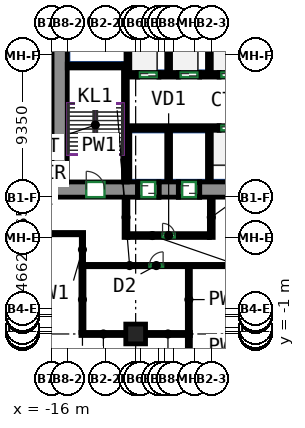
"""IFC4 building model, lengths in metres.
Left out: names, types, materials, properties, quantities, classifications, styles, units other than length and angle.
Written with IfcOpenShell. Run it as: python <this file> out.ifc"""

import sys

from ifc_helpers import new_model, si_unit, direction, frame, frame_2d, origin, origin_2d, place, context, subcontext, project, spatial, rectangle, extrude, source, transform, mapped, element, fill, save


model = new_model("IFC4")
c1 = context("Model", 3, precision=1e-05, world=origin(), true_north=direction((0.0, 1.0)))
c2 = subcontext(c1, "Body", "Model", "MODEL_VIEW")
j1 = project(units=[si_unit("LENGTHUNIT", "METRE"), si_unit("PLANEANGLEUNIT", "RADIAN")], contexts=[c1])
p1 = place(None, origin())
s1 = spatial("IfcSite", under=j1, at=p1, CompositionType="ELEMENT")
p2 = place(p1, origin())
s2 = spatial("IfcBuilding", under=s1, at=p2, CompositionType="ELEMENT")
p3 = place(p2, origin())
s3 = spatial("IfcBuildingStorey", under=s2, at=p3, CompositionType="ELEMENT", Elevation=0.0)
m1 = source(origin(), c2, "Body", "SweptSolid", [
    extrude(rectangle(XDim=1.3, YDim=1.3, at=origin_2d()), origin(), (0.0, 0.0, 1.0), 8.6),
])
p4 = place(p3, frame((-10.5, -1.0, 0.0), z_axis=(0.0, 0.0, 1.0), x_axis=(1.0, 0.0, 0.0)))
e1 = element("IfcColumn", 1, at=p4, inside=s3, PredefinedType="COLUMN", context=c2, shape_type="MappedRepresentation", body=[
    mapped(m1, transform((0.0, 0.0, 0.0))),
])
m2 = source(origin(), c2, "Body", "SweptSolid", [
    extrude(rectangle(XDim=5.63, YDim=1.0, at=frame_2d((2.815, 0.0))), origin(), (0.0, 0.0, 1.0), 8.6),
])
p5 = place(p3, frame((-16.0, 8.5, 0.0), z_axis=(0.0, 0.0, 1.0), x_axis=(1.0, 0.0, 0.0)))
e2 = element("IfcWall", 2, at=p5, inside=s3, PredefinedType="SHEAR", context=c2, shape_type="MappedRepresentation", body=[
    mapped(m2, transform((0.0, 0.0, 0.0))),
])
p6 = place(p5, frame((2.25, 0.0, 0.0)))
e3 = element("IfcOpeningElement", 3, at=p6, cuts=e2, PredefinedType="OPENING", context=c2, shape_type="SweptSolid", body=[
    extrude(rectangle(XDim=1.2, YDim=2.1, at=frame_2d((0.6, 1.05))), frame((0.0, 0.51, 0.0), z_axis=(0.0, -1.0, 0.0), x_axis=(1.0, 0.0, 0.0)), (0.0, 0.0, 1.0), 1.02),
])
m3 = source(origin(), c2, "Body", "SweptSolid", [
    extrude(rectangle(XDim=1.28, YDim=1.0, at=frame_2d((0.64, 0.0))), origin(), (0.0, 0.0, 1.0), 8.6),
])
p7 = place(p3, frame((-8.97, 8.5, 0.0), z_axis=(0.0, 0.0, 1.0), x_axis=(1.0, 0.0, 0.0)))
e4 = element("IfcWall", 4, at=p7, inside=s3, PredefinedType="SHEAR", context=c2, shape_type="MappedRepresentation", body=[
    mapped(m3, transform((0.0, 0.0, 0.0))),
])
m4 = source(origin(), c2, "Body", "SweptSolid", [
    extrude(rectangle(XDim=14.18, YDim=1.0, at=frame_2d((7.09, 0.0))), origin(), (0.0, 0.0, 1.0), 8.6),
])
p8 = place(p3, frame((-6.29, 8.5, 0.0), z_axis=(0.0, 0.0, 1.0), x_axis=(1.0, 0.0, 0.0)))
e5 = element("IfcWall", 5, at=p8, inside=s3, PredefinedType="SHEAR", context=c2, shape_type="MappedRepresentation", body=[
    mapped(m4, transform((0.0, 0.0, 0.0))),
])
m5 = source(origin(), c2, "Body", "SweptSolid", [
    extrude(rectangle(XDim=12.0, YDim=1.0, at=frame_2d((6.0, 0.0))), origin(), (0.0, 0.0, 1.0), 8.6),
])
p9 = place(p3, frame((-15.5, 9.0, 0.0), z_axis=(0.0, 0.0, 1.0), x_axis=(0.0, 1.0, 0.0)))
e6 = element("IfcWall", 6, at=p9, inside=s3, PredefinedType="SHEAR", context=c2, shape_type="MappedRepresentation", body=[
    mapped(m5, transform((0.0, 0.0, 0.0))),
])
m6 = source(origin(), c2, "Body", "SweptSolid", [
    extrude(rectangle(XDim=7.75, YDim=0.25, at=frame_2d((3.875, 0.0))), origin(), (0.0, 0.0, 1.0), 8.6),
])
p10 = place(p3, frame((-11.175, 9.0, 0.0), z_axis=(0.0, 0.0, 1.0), x_axis=(0.0, 1.0, 0.0)))
e7 = element("IfcWall", 7, at=p10, inside=s3, PredefinedType="SHEAR", context=c2, shape_type="MappedRepresentation", body=[
    mapped(m6, transform((0.0, 0.0, 0.0))),
])
m7 = source(origin(), c2, "Body", "SweptSolid", [
    extrude(rectangle(XDim=3.7, YDim=0.25, at=frame_2d((1.85, 0.0))), origin(), (0.0, 0.0, 1.0), 8.6),
])
p11 = place(p3, frame((-15.0, 16.625, 0.0), z_axis=(0.0, 0.0, 1.0), x_axis=(1.0, 0.0, 0.0)))
e8 = element("IfcWall", 8, at=p11, inside=s3, PredefinedType="SHEAR", context=c2, shape_type="MappedRepresentation", body=[
    mapped(m7, transform((0.0, 0.0, 0.0))),
])
m8 = source(origin(), c2, "Body", "SweptSolid", [
    extrude(rectangle(XDim=6.0, YDim=0.3, at=frame_2d((3.0, 0.0))), origin(), (0.0, 0.0, 1.0), 8.6),
])
p12 = place(p3, frame((-11.01, 12.55, 0.0), z_axis=(0.0, 0.0, 1.0), x_axis=(1.0, 0.0, 0.0)))
e9 = element("IfcWall", 9, at=p12, inside=s3, PredefinedType="SHEAR", context=c2, shape_type="MappedRepresentation", body=[
    mapped(m8, transform((0.0, 0.0, 0.0))),
])
m9 = source(origin(), c2, "Body", "SweptSolid", [
    extrude(rectangle(XDim=0.64, YDim=0.3, at=frame_2d((0.32, 0.0))), origin(), (0.0, 0.0, 1.0), 8.6),
])
p13 = place(p3, frame((-11.01, 16.05, 0.0), z_axis=(0.0, 0.0, 1.0), x_axis=(1.0, 0.0, 0.0)))
e10 = element("IfcWall", 10, at=p13, inside=s3, PredefinedType="SHEAR", context=c2, shape_type="MappedRepresentation", body=[
    mapped(m9, transform((0.0, 0.0, 0.0))),
])
m10 = source(origin(), c2, "Body", "SweptSolid", [
    extrude(rectangle(XDim=1.28, YDim=0.3, at=frame_2d((0.64, 0.0))), origin(), (0.0, 0.0, 1.0), 8.6),
])
for number, where, z_axis, x_axis in (
    (11, (-8.97, 16.05, 0.0), (0.0, 0.0, 1.0), (1.0, 0.0, 0.0)),
    (12, (-6.29, 16.05, 0.0), (0.0, 0.0, 1.0), (1.0, 0.0, 0.0)),
):
    element("IfcWall", number, at=place(p3, frame(where, z_axis=z_axis, x_axis=x_axis)), inside=s3, PredefinedType="SHEAR", context=c2, shape_type="MappedRepresentation", body=[
        mapped(m10, transform((0.0, 0.0, 0.0))),
    ])
m11 = source(origin(), c2, "Body", "SweptSolid", [
    extrude(rectangle(XDim=1.4, YDim=1.0, at=frame_2d((0.7, 0.0))), origin(), (0.0, 0.0, 1.0), 4.7),
])
p14 = place(p3, frame((-10.37, 8.5, 3.9), z_axis=(0.0, 0.0, 1.0), x_axis=(1.0, 0.0, 0.0)))
e13 = element("IfcWall", 13, at=p14, inside=s3, PredefinedType="SHEAR", context=c2, shape_type="MappedRepresentation", body=[
    mapped(m11, transform((0.0, 0.0, 0.0))),
])
m12 = source(origin(), c2, "Body", "SweptSolid", [
    extrude(rectangle(XDim=1.4, YDim=1.0, at=frame_2d((0.7, 0.0))), origin(), (0.0, 0.0, 1.0), 4.65),
])
p15 = place(p3, frame((-7.69, 8.5, 3.95), z_axis=(0.0, 0.0, 1.0), x_axis=(1.0, 0.0, 0.0)))
e14 = element("IfcWall", 14, at=p15, inside=s3, PredefinedType="SHEAR", context=c2, shape_type="MappedRepresentation", body=[
    mapped(m12, transform((0.0, 0.0, 0.0))),
])
m13 = source(origin(), c2, "Body", "SweptSolid", [
    extrude(rectangle(XDim=1.4, YDim=0.3, at=frame_2d((0.7, 0.0))), origin(), (0.0, 0.0, 1.0), 8.6),
])
p16 = place(p3, frame((-5.01, 12.55, 0.0), z_axis=(0.0, 0.0, 1.0), x_axis=(1.0, 0.0, 0.0)))
e15 = element("IfcWall", 15, at=p16, inside=s3, PredefinedType="PARTITIONING", context=c2, shape_type="MappedRepresentation", body=[
    mapped(m13, transform((0.0, 0.0, 0.0))),
])
p17 = place(p16, frame((0.15, 0.0, 0.0)))
e16 = element("IfcOpeningElement", 16, at=p17, cuts=e15, PredefinedType="OPENING", context=c2, shape_type="SweptSolid", body=[
    extrude(rectangle(XDim=1.1, YDim=2.1, at=frame_2d((0.55, 1.05))), frame((0.0, 0.16, 0.0), z_axis=(0.0, -1.0, 0.0), x_axis=(1.0, 0.0, 0.0)), (0.0, 0.0, 1.0), 0.32),
])
m14 = source(origin(), c2, "Body", "SweptSolid", [
    extrude(rectangle(XDim=1.4, YDim=0.3, at=frame_2d((0.7, 0.0))), origin(), (0.0, 0.0, 1.0), 8.6),
])
p18 = place(p3, frame((-10.37, 16.05, 0.0), z_axis=(0.0, 0.0, 1.0), x_axis=(1.0, 0.0, 0.0)))
e17 = element("IfcWall", 17, at=p18, inside=s3, PredefinedType="PARTITIONING", context=c2, shape_type="MappedRepresentation", body=[
    mapped(m14, transform((0.0, 0.0, 0.0))),
])
p19 = place(p18, frame((0.15, 0.0, 0.0)))
e18 = element("IfcOpeningElement", 18, at=p19, cuts=e17, PredefinedType="OPENING", context=c2, shape_type="SweptSolid", body=[
    extrude(rectangle(XDim=1.1, YDim=2.1, at=frame_2d((0.55, 1.05))), frame((0.0, 0.16, 0.0), z_axis=(0.0, -1.0, 0.0), x_axis=(1.0, 0.0, 0.0)), (0.0, 0.0, 1.0), 0.32),
])
p20 = place(p3, frame((-7.69, 16.05, 0.0), z_axis=(0.0, 0.0, 1.0), x_axis=(1.0, 0.0, 0.0)))
e19 = element("IfcWall", 19, at=p20, inside=s3, PredefinedType="PARTITIONING", context=c2, shape_type="MappedRepresentation", body=[
    mapped(m13, transform((0.0, 0.0, 0.0))),
])
p21 = place(p20, frame((0.15, 0.0, 0.0)))
e20 = element("IfcOpeningElement", 20, at=p21, cuts=e19, PredefinedType="OPENING", context=c2, shape_type="SweptSolid", body=[
    extrude(rectangle(XDim=1.1, YDim=2.1, at=frame_2d((0.55, 1.05))), frame((0.0, 0.16, 0.0), z_axis=(0.0, -1.0, 0.0), x_axis=(1.0, 0.0, 0.0)), (0.0, 0.0, 1.0), 0.32),
])
p22 = place(p3, frame((-5.01, 16.05, 0.0), z_axis=(0.0, 0.0, 1.0), x_axis=(1.0, 0.0, 0.0)))
e21 = element("IfcWall", 21, at=p22, inside=s3, PredefinedType="PARTITIONING", context=c2, shape_type="MappedRepresentation", body=[
    mapped(m13, transform((0.0, 0.0, 0.0))),
])
p23 = place(p22, frame((0.15, 0.0, 0.0)))
e22 = element("IfcOpeningElement", 22, at=p23, cuts=e21, PredefinedType="OPENING", context=c2, shape_type="SweptSolid", body=[
    extrude(rectangle(XDim=1.1, YDim=2.1, at=frame_2d((0.55, 1.05))), frame((0.0, 0.16, 0.0), z_axis=(0.0, -1.0, 0.0), x_axis=(1.0, 0.0, 0.0)), (0.0, 0.0, 1.0), 0.32),
])
m15 = source(origin(), c2, "Body", "SweptSolid", [
    extrude(rectangle(XDim=2.65, YDim=0.25, at=frame_2d((1.325, 0.0))), origin(), (0.0, 0.0, 1.0), 8.6),
])
for number, where, z_axis, x_axis in (
    (23, (-11.135, 5.35, 0.0), (0.0, 0.0, 1.0), (0.0, 1.0, 0.0)),
    (24, (-5.525, 5.35, 0.0), (0.0, 0.0, 1.0), (0.0, 1.0, 0.0)),
):
    element("IfcWall", number, at=place(p3, frame(where, z_axis=z_axis, x_axis=x_axis)), inside=s3, PredefinedType="PARTITIONING", context=c2, shape_type="MappedRepresentation", body=[
        mapped(m15, transform((0.0, 0.0, 0.0))),
    ])
m16 = source(origin(), c2, "Body", "SweptSolid", [
    extrude(rectangle(XDim=5.36, YDim=0.25, at=frame_2d((2.68, 0.0))), origin(), (0.0, 0.0, 1.0), 8.6),
])
p24 = place(p3, frame((-11.01, 5.475, 0.0), z_axis=(0.0, 0.0, 1.0), x_axis=(1.0, 0.0, 0.0)))
e25 = element("IfcWall", 25, at=p24, inside=s3, PredefinedType="PARTITIONING", context=c2, shape_type="MappedRepresentation", body=[
    mapped(m16, transform((0.0, 0.0, 0.0))),
])
p25 = place(p24, frame((2.28, 0.0, 0.0)))
e26 = element("IfcOpeningElement", 26, at=p25, cuts=e25, PredefinedType="OPENING", context=c2, shape_type="SweptSolid", body=[
    extrude(rectangle(XDim=0.8, YDim=2.0, at=frame_2d((0.4, 1.0))), frame((0.0, 0.135, 0.0), z_axis=(0.0, -1.0, 0.0), x_axis=(1.0, 0.0, 0.0)), (0.0, 0.0, 1.0), 0.27),
])
m17 = source(origin(), c2, "Body", "SweptSolid", [
    extrude(rectangle(XDim=3.275, YDim=0.165, at=frame_2d((1.638, 0.0))), origin(), (0.0, 0.0, 1.0), 8.6),
])
p26 = place(p3, frame((-10.968, 16.2, 0.0), z_axis=(0.0, 0.0, 1.0), x_axis=(0.0, 1.0, 0.0)))
e27 = element("IfcWall", 27, at=p26, inside=s3, PredefinedType="PARTITIONING", context=c2, shape_type="MappedRepresentation", body=[
    mapped(m17, transform((0.0, 0.0, 0.0))),
])
m18 = source(origin(), c2, "Body", "SweptSolid", [
    extrude(rectangle(XDim=2.725, YDim=0.085, at=frame_2d((1.363, 0.0))), origin(), (0.0, 0.0, 1.0), 8.6),
])
p27 = place(p3, frame((-11.093, 16.75, 0.0), z_axis=(0.0, 0.0, 1.0), x_axis=(0.0, 1.0, 0.0)))
e28 = element("IfcWall", 28, at=p27, inside=s3, PredefinedType="PARTITIONING", context=c2, shape_type="MappedRepresentation", body=[
    mapped(m18, transform((0.0, 0.0, 0.0))),
])
m19 = source(origin(), c2, "Body", "SweptSolid", [
    extrude(rectangle(XDim=3.275, YDim=0.25, at=frame_2d((1.638, 0.0))), origin(), (0.0, 0.0, 1.0), 8.6),
])
for number, where, z_axis, x_axis in (
    (29, (-5.65, 16.2, 0.0), (0.0, 0.0, 1.0), (0.0, 1.0, 0.0)),
    (30, (-8.33, 16.2, 0.0), (0.0, 0.0, 1.0), (0.0, 1.0, 0.0)),
):
    element("IfcWall", number, at=place(p3, frame(where, z_axis=z_axis, x_axis=x_axis)), inside=s3, PredefinedType="PARTITIONING", context=c2, shape_type="MappedRepresentation", body=[
        mapped(m19, transform((0.0, 0.0, 0.0))),
    ])
m20 = source(origin(), c2, "Body", "SweptSolid", [
    extrude(rectangle(XDim=3.4, YDim=0.165, at=frame_2d((1.7, 0.0))), origin(), (0.0, 0.0, 1.0), 8.6),
])
p28 = place(p3, frame((-10.968, 9.0, 0.0), z_axis=(0.0, 0.0, 1.0), x_axis=(0.0, 1.0, 0.0)))
e31 = element("IfcWall", 31, at=p28, inside=s3, PredefinedType="PARTITIONING", context=c2, shape_type="MappedRepresentation", body=[
    mapped(m20, transform((0.0, 0.0, 0.0))),
])
m21 = source(origin(), c2, "Body", "SweptSolid", [
    extrude(rectangle(XDim=3.4, YDim=0.25, at=frame_2d((1.7, 0.0))), origin(), (0.0, 0.0, 1.0), 8.6),
])
for number, where, z_axis, x_axis in (
    (32, (-5.65, 9.0, 0.0), (0.0, 0.0, 1.0), (0.0, 1.0, 0.0)),
    (33, (-8.33, 9.0, 0.0), (0.0, 0.0, 1.0), (0.0, 1.0, 0.0)),
):
    element("IfcWall", number, at=place(p3, frame(where, z_axis=z_axis, x_axis=x_axis)), inside=s3, PredefinedType="PARTITIONING", context=c2, shape_type="MappedRepresentation", body=[
        mapped(m21, transform((0.0, 0.0, 0.0))),
    ])
m22 = source(origin(), c2, "Body", "SweptSolid", [
    extrude(rectangle(XDim=1.4, YDim=1.0, at=frame_2d((0.7, 0.0))), origin(), (0.0, 0.0, 1.0), 2.7),
])
p29 = place(p3, frame((-10.37, 8.5, 0.0), z_axis=(0.0, 0.0, 1.0), x_axis=(1.0, 0.0, 0.0)))
e34 = element("IfcWall", 34, at=p29, inside=s3, PredefinedType="PARTITIONING", context=c2, shape_type="MappedRepresentation", body=[
    mapped(m22, transform((0.0, 0.0, 0.0))),
])
p30 = place(p29, frame((0.25, 0.0, 0.0)))
e35 = element("IfcOpeningElement", 35, at=p30, cuts=e34, PredefinedType="OPENING", context=c2, shape_type="SweptSolid", body=[
    extrude(rectangle(XDim=0.9, YDim=2.1, at=frame_2d((0.45, 1.05))), frame((0.0, 0.51, 0.0), z_axis=(0.0, -1.0, 0.0), x_axis=(1.0, 0.0, 0.0)), (0.0, 0.0, 1.0), 1.02),
])
m23 = source(origin(), c2, "Body", "SweptSolid", [
    extrude(rectangle(XDim=1.4, YDim=1.0, at=frame_2d((0.7, 0.0))), origin(), (0.0, 0.0, 1.0), 2.7),
])
p31 = place(p3, frame((-7.69, 8.5, 0.0), z_axis=(0.0, 0.0, 1.0), x_axis=(1.0, 0.0, 0.0)))
e36 = element("IfcWall", 36, at=p31, inside=s3, PredefinedType="PARTITIONING", context=c2, shape_type="MappedRepresentation", body=[
    mapped(m23, transform((0.0, 0.0, 0.0))),
])
p32 = place(p31, frame((0.25, 0.0, 0.0)))
e37 = element("IfcOpeningElement", 37, at=p32, cuts=e36, PredefinedType="OPENING", context=c2, shape_type="SweptSolid", body=[
    extrude(rectangle(XDim=0.9, YDim=2.1, at=frame_2d((0.45, 1.05))), frame((0.0, 0.51, 0.0), z_axis=(0.0, -1.0, 0.0), x_axis=(1.0, 0.0, 0.0)), (0.0, 0.0, 1.0), 1.02),
])
p33 = place(p3, frame((-14.0, 5.525, 0.0), z_axis=(0.0, 0.0, 1.0), x_axis=(0.0, -1.0, 0.0)))
e38 = element("IfcWall", 38, at=p33, inside=s3, PredefinedType="PARTITIONING", context=c2, shape_type="SweptSolid", body=[
    extrude(rectangle(XDim=1.95, YDim=0.15, at=frame_2d((0.975, 0.0))), origin(), (0.0, 0.0, 1.0), 8.6),
])
p34 = place(p3, frame((-19.275, 5.6, 0.0), z_axis=(0.0, 0.0, 1.0), x_axis=(1.0, 0.0, 0.0)))
e39 = element("IfcWall", 39, at=p34, inside=s3, PredefinedType="PARTITIONING", context=c2, shape_type="SweptSolid", body=[
    extrude(rectangle(XDim=5.35, YDim=0.15, at=frame_2d((2.675, 0.0))), origin(), (0.0, 0.0, 1.0), 8.6),
])
p35 = place(p3, frame((-14.1, 3.5, 0.0), z_axis=(0.0, 0.0, 1.0), x_axis=(1.0, 0.0, 0.0)))
e40 = element("IfcWall", 40, at=p35, inside=s3, PredefinedType="PARTITIONING", context=c2, shape_type="SweptSolid", body=[
    extrude(rectangle(XDim=10.675, YDim=0.15, at=frame_2d((5.337, 0.0))), origin(), (0.0, 0.0, 1.0), 8.6),
])
p36 = place(p35, frame((4.507, 0.0, 0.0)))
e41 = element("IfcOpeningElement", 41, at=p36, cuts=e40, PredefinedType="OPENING", context=c2, shape_type="SweptSolid", body=[
    extrude(rectangle(XDim=0.9, YDim=2.1, at=frame_2d((0.45, 1.05))), frame((0.0, 0.085, 0.0), z_axis=(0.0, -1.0, 0.0), x_axis=(1.0, 0.0, 0.0)), (0.0, 0.0, 1.0), 0.17),
])
p37 = place(p3, frame((-14.0, -0.898, 0.0), z_axis=(0.0, 0.0, 1.0), x_axis=(0.0, 1.0, 0.0)))
e42 = element("IfcWall", 42, at=p37, inside=s3, PredefinedType="PARTITIONING", context=c2, shape_type="SweptSolid", body=[
    extrude(rectangle(XDim=4.322, YDim=0.2, at=frame_2d((2.161, 0.0))), origin(), (0.0, 0.0, 1.0), 8.6),
])
p38 = place(p3, frame((-14.098, -1.0, 0.0), z_axis=(0.0, 0.0, 1.0), x_axis=(1.0, 0.0, 0.0)))
e43 = element("IfcWall", 43, at=p38, inside=s3, PredefinedType="PARTITIONING", context=c2, shape_type="SweptSolid", body=[
    extrude(rectangle(XDim=2.948, YDim=0.2, at=frame_2d((1.474, 0.0))), origin(), (0.0, 0.0, 1.0), 7.95),
])
p39 = place(p3, frame((-9.85, -1.0, 0.0), z_axis=(0.0, 0.0, 1.0), x_axis=(1.0, 0.0, 0.0)))
e44 = element("IfcWall", 44, at=p39, inside=s3, PredefinedType="PARTITIONING", context=c2, shape_type="SweptSolid", body=[
    extrude(rectangle(XDim=2.95, YDim=0.2, at=frame_2d((1.475, 0.0))), origin(), (0.0, 0.0, 1.0), 7.95),
])
for number, where, z_axis, x_axis in (
    (45, (-7.0, -5.424, 0.0), (0.0, 0.0, 1.0), (0.0, 1.0, 0.0)),
    (46, (-7.0, -0.9, 0.0), (0.0, 0.0, 1.0), (0.0, 1.0, 0.0)),
):
    element("IfcWall", number, at=place(p3, frame(where, z_axis=z_axis, x_axis=x_axis)), inside=s3, PredefinedType="PARTITIONING", context=c2, shape_type="SweptSolid", body=[
        extrude(rectangle(XDim=4.324, YDim=0.2, at=frame_2d((2.162, 0.0))), origin(), (0.0, 0.0, 1.0), 8.6),
    ])
p40 = place(p25, origin())
e47 = element("IfcDoor", 47, at=p40, inside=s3, OperationType="SINGLE_SWING_LEFT", PredefinedType="DOOR", context=c2, shape_type="SweptSolid", body=[
    extrude(rectangle(XDim=0.8, YDim=2.0, at=frame_2d((0.4, 1.0))), frame((0.0, 0.025, 0.0), z_axis=(0.0, -1.0, 0.0), x_axis=(1.0, 0.0, 0.0)), (0.0, 0.0, 1.0), 0.05),
])
fill(e26, e47)
p41 = place(p30, origin())
e48 = element("IfcDoor", 48, at=p41, inside=s3, OperationType="SLIDING_TO_LEFT", PredefinedType="DOOR", context=c2, shape_type="SweptSolid", body=[
    extrude(rectangle(XDim=0.9, YDim=2.1, at=frame_2d((0.45, 1.05))), frame((0.0, 0.405, 0.0), z_axis=(0.0, -1.0, 0.0), x_axis=(1.0, 0.0, 0.0)), (0.0, 0.0, 1.0), 0.05),
])
fill(e35, e48)
p42 = place(p32, origin())
e49 = element("IfcDoor", 49, at=p42, inside=s3, OperationType="SLIDING_TO_RIGHT", PredefinedType="DOOR", context=c2, shape_type="SweptSolid", body=[
    extrude(rectangle(XDim=0.9, YDim=2.1, at=frame_2d((0.45, 1.05))), frame((0.0, 0.405, 0.0), z_axis=(0.0, -1.0, 0.0), x_axis=(1.0, 0.0, 0.0)), (0.0, 0.0, 1.0), 0.05),
])
fill(e37, e49)
p43 = place(p17, origin())
e50 = element("IfcDoor", 50, at=p43, inside=s3, OperationType="DOUBLE_DOOR_SLIDING", PredefinedType="DOOR", context=c2, shape_type="SweptSolid", body=[
    extrude(rectangle(XDim=1.1, YDim=2.1, at=frame_2d((0.55, 1.05))), frame((0.0, 0.025, 0.0), z_axis=(0.0, -1.0, 0.0), x_axis=(1.0, 0.0, 0.0)), (0.0, 0.0, 1.0), 0.05),
])
fill(e16, e50)
p44 = place(p19, origin())
e51 = element("IfcDoor", 51, at=p44, inside=s3, OperationType="DOUBLE_DOOR_SLIDING", PredefinedType="DOOR", context=c2, shape_type="SweptSolid", body=[
    extrude(rectangle(XDim=1.1, YDim=2.1, at=frame_2d((0.55, 1.05))), frame((0.0, 0.025, 0.0), z_axis=(0.0, -1.0, 0.0), x_axis=(1.0, 0.0, 0.0)), (0.0, 0.0, 1.0), 0.05),
])
fill(e18, e51)
p45 = place(p21, origin())
e52 = element("IfcDoor", 52, at=p45, inside=s3, OperationType="DOUBLE_DOOR_SLIDING", PredefinedType="DOOR", context=c2, shape_type="SweptSolid", body=[
    extrude(rectangle(XDim=1.1, YDim=2.1, at=frame_2d((0.55, 1.05))), frame((0.0, 0.025, 0.0), z_axis=(0.0, -1.0, 0.0), x_axis=(1.0, 0.0, 0.0)), (0.0, 0.0, 1.0), 0.05),
])
fill(e20, e52)
p46 = place(p23, origin())
e53 = element("IfcDoor", 53, at=p46, inside=s3, OperationType="DOUBLE_DOOR_SLIDING", PredefinedType="DOOR", context=c2, shape_type="SweptSolid", body=[
    extrude(rectangle(XDim=1.1, YDim=2.1, at=frame_2d((0.55, 1.05))), frame((0.0, 0.025, 0.0), z_axis=(0.0, -1.0, 0.0), x_axis=(1.0, 0.0, 0.0)), (0.0, 0.0, 1.0), 0.05),
])
fill(e22, e53)
p47 = place(p6, origin())
e54 = element("IfcDoor", 54, at=p47, inside=s3, OperationType="DOUBLE_DOOR_SINGLE_SWING", PredefinedType="DOOR", context=c2, shape_type="SweptSolid", body=[
    extrude(rectangle(XDim=1.2, YDim=2.1, at=frame_2d((0.6, 1.05))), frame((0.0, 0.405, 0.0), z_axis=(0.0, -1.0, 0.0), x_axis=(1.0, 0.0, 0.0)), (0.0, 0.0, 1.0), 0.05),
])
fill(e3, e54)
p48 = place(p36, origin())
e55 = element("IfcDoor", 55, at=p48, inside=s3, OperationType="SINGLE_SWING_RIGHT", PredefinedType="DOOR", context=c2, shape_type="SweptSolid", body=[
    extrude(rectangle(XDim=0.9, YDim=2.1, at=frame_2d((0.45, 1.05))), frame((0.0, 0.025, 0.0), z_axis=(0.0, -1.0, 0.0), x_axis=(1.0, 0.0, 0.0)), (0.0, 0.0, 1.0), 0.05),
])
fill(e41, e55)
save(model, sys.argv[1])
